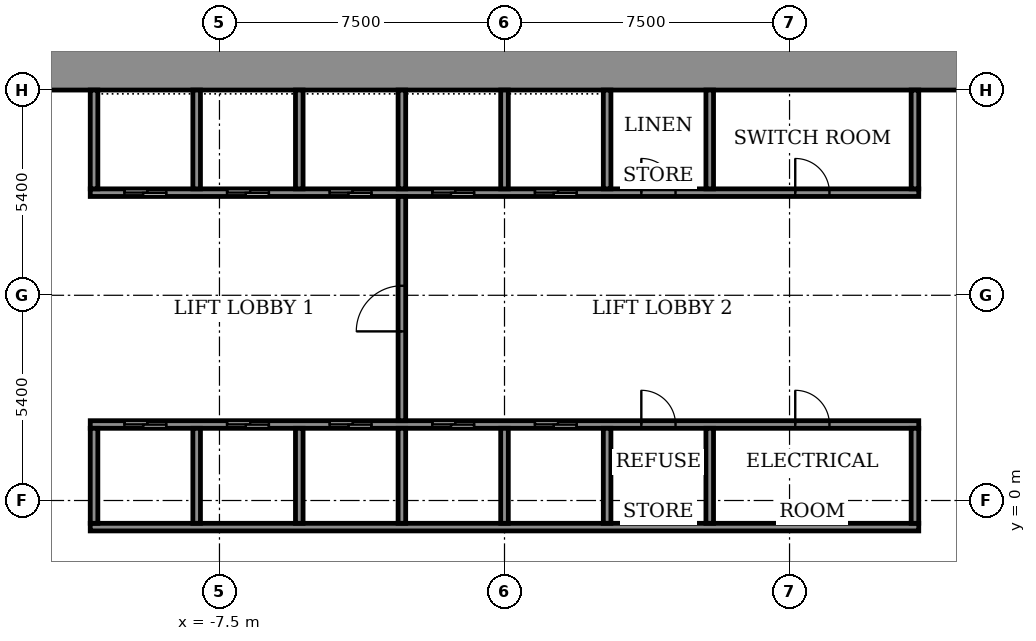
"""IFC4 building model, lengths in metres.
Left out: names, types, materials, properties, quantities, classifications, styles, units other than length and angle.
Written with IfcOpenShell. Run it as: python <this file> out.ifc"""

import sys

from ifc_helpers import new_model, si_unit, direction, frame, frame_2d, origin, place, context, subcontext, project, spatial, rectangle, extrude, element, fill, save


model = new_model("IFC4")
c1 = context("Model", 3, precision=1e-05, world=origin(), true_north=direction((0.0, 1.0)))
c2 = subcontext(c1, "Body", "Model", "MODEL_VIEW")
j1 = project(units=[si_unit("LENGTHUNIT", "METRE"), si_unit("PLANEANGLEUNIT", "RADIAN")], contexts=[c1])
p1 = place(None, origin())
s1 = spatial("IfcSite", under=j1, at=p1, CompositionType="ELEMENT")
p2 = place(p1, origin())
s2 = spatial("IfcBuilding", under=s1, at=p2, CompositionType="ELEMENT")
p3 = place(p2, frame((0.0, 0.0, 25.0)))
s3 = spatial("IfcBuildingStorey", under=s2, at=p3, CompositionType="ELEMENT", Elevation=25.0)
p4 = place(p3, frame((-15.0, 11.4, 0.0), z_axis=(0.0, 0.0, 1.0), x_axis=(1.0, 0.0, 0.0)))
e1 = element("IfcWall", 1, at=p4, inside=s3, PredefinedType="SHEAR", context=c2, shape_type="SweptSolid", body=[
    extrude(rectangle(XDim=30.0, YDim=1.2, at=frame_2d((15.0, 0.0))), origin(), (0.0, 0.0, 1.0), 4.5),
])
p5 = place(p3, frame((-10.9, -0.7, 0.0), z_axis=(0.0, 0.0, 1.0), x_axis=(1.0, 0.0, 0.0)))
e2 = element("IfcWall", 2, at=p5, inside=s3, PredefinedType="SHEAR", context=c2, shape_type="SweptSolid", body=[
    extrude(rectangle(XDim=21.8, YDim=0.2, at=frame_2d((10.9, 0.0))), origin(), (0.0, 0.0, 1.0), 3.95),
])
p6 = place(p3, frame((-10.9, 2.0, 0.0), z_axis=(0.0, 0.0, 1.0), x_axis=(1.0, 0.0, 0.0)))
e3 = element("IfcWall", 3, at=p6, inside=s3, PredefinedType="SHEAR", context=c2, shape_type="SweptSolid", body=[
    extrude(rectangle(XDim=21.8, YDim=0.2, at=frame_2d((10.9, 0.0))), origin(), (0.0, 0.0, 1.0), 3.95),
])
p7 = place(p6, frame((0.9, 0.0, 0.0)))
e4 = element("IfcOpeningElement", 4, at=p7, cuts=e3, PredefinedType="OPENING", context=c2, shape_type="SweptSolid", body=[
    extrude(rectangle(XDim=1.1, YDim=2.1, at=frame_2d((0.55, 1.05))), frame((0.0, 0.11, 0.0), z_axis=(0.0, -1.0, 0.0), x_axis=(1.0, 0.0, 0.0)), (0.0, 0.0, 1.0), 0.22),
])
p8 = place(p6, frame((3.6, 0.0, 0.0)))
e5 = element("IfcOpeningElement", 5, at=p8, cuts=e3, PredefinedType="OPENING", context=c2, shape_type="SweptSolid", body=[
    extrude(rectangle(XDim=1.1, YDim=2.1, at=frame_2d((0.55, 1.05))), frame((0.0, 0.11, 0.0), z_axis=(0.0, -1.0, 0.0), x_axis=(1.0, 0.0, 0.0)), (0.0, 0.0, 1.0), 0.22),
])
p9 = place(p6, frame((6.3, 0.0, 0.0)))
e6 = element("IfcOpeningElement", 6, at=p9, cuts=e3, PredefinedType="OPENING", context=c2, shape_type="SweptSolid", body=[
    extrude(rectangle(XDim=1.1, YDim=2.1, at=frame_2d((0.55, 1.05))), frame((0.0, 0.11, 0.0), z_axis=(0.0, -1.0, 0.0), x_axis=(1.0, 0.0, 0.0)), (0.0, 0.0, 1.0), 0.22),
])
p10 = place(p6, frame((9.0, 0.0, 0.0)))
e7 = element("IfcOpeningElement", 7, at=p10, cuts=e3, PredefinedType="OPENING", context=c2, shape_type="SweptSolid", body=[
    extrude(rectangle(XDim=1.1, YDim=2.1, at=frame_2d((0.55, 1.05))), frame((0.0, 0.11, 0.0), z_axis=(0.0, -1.0, 0.0), x_axis=(1.0, 0.0, 0.0)), (0.0, 0.0, 1.0), 0.22),
])
p11 = place(p6, frame((11.7, 0.0, 0.0)))
e8 = element("IfcOpeningElement", 8, at=p11, cuts=e3, PredefinedType="OPENING", context=c2, shape_type="SweptSolid", body=[
    extrude(rectangle(XDim=1.1, YDim=2.1, at=frame_2d((0.55, 1.05))), frame((0.0, 0.11, 0.0), z_axis=(0.0, -1.0, 0.0), x_axis=(1.0, 0.0, 0.0)), (0.0, 0.0, 1.0), 0.22),
])
p12 = place(p6, frame((14.5, 0.0, 0.0)))
e9 = element("IfcOpeningElement", 9, at=p12, cuts=e3, PredefinedType="OPENING", context=c2, shape_type="SweptSolid", body=[
    extrude(rectangle(XDim=0.9, YDim=2.1, at=frame_2d((0.45, 1.05))), frame((0.0, 0.11, 0.0), z_axis=(0.0, -1.0, 0.0), x_axis=(1.0, 0.0, 0.0)), (0.0, 0.0, 1.0), 0.22),
])
p13 = place(p6, frame((18.55, 0.0, 0.0)))
e10 = element("IfcOpeningElement", 10, at=p13, cuts=e3, PredefinedType="OPENING", context=c2, shape_type="SweptSolid", body=[
    extrude(rectangle(XDim=0.9, YDim=2.1, at=frame_2d((0.45, 1.05))), frame((0.0, 0.11, 0.0), z_axis=(0.0, -1.0, 0.0), x_axis=(1.0, 0.0, 0.0)), (0.0, 0.0, 1.0), 0.22),
])
p14 = place(p3, frame((-10.9, 8.1, 0.0), z_axis=(0.0, 0.0, 1.0), x_axis=(1.0, 0.0, 0.0)))
e11 = element("IfcWall", 11, at=p14, inside=s3, PredefinedType="SHEAR", context=c2, shape_type="SweptSolid", body=[
    extrude(rectangle(XDim=21.8, YDim=0.2, at=frame_2d((10.9, 0.0))), origin(), (0.0, 0.0, 1.0), 3.95),
])
p15 = place(p14, frame((0.9, 0.0, 0.0)))
e12 = element("IfcOpeningElement", 12, at=p15, cuts=e11, PredefinedType="OPENING", context=c2, shape_type="SweptSolid", body=[
    extrude(rectangle(XDim=1.1, YDim=2.1, at=frame_2d((0.55, 1.05))), frame((0.0, 0.11, 0.0), z_axis=(0.0, -1.0, 0.0), x_axis=(1.0, 0.0, 0.0)), (0.0, 0.0, 1.0), 0.22),
])
p16 = place(p14, frame((3.6, 0.0, 0.0)))
e13 = element("IfcOpeningElement", 13, at=p16, cuts=e11, PredefinedType="OPENING", context=c2, shape_type="SweptSolid", body=[
    extrude(rectangle(XDim=1.1, YDim=2.1, at=frame_2d((0.55, 1.05))), frame((0.0, 0.11, 0.0), z_axis=(0.0, -1.0, 0.0), x_axis=(1.0, 0.0, 0.0)), (0.0, 0.0, 1.0), 0.22),
])
p17 = place(p14, frame((6.3, 0.0, 0.0)))
e14 = element("IfcOpeningElement", 14, at=p17, cuts=e11, PredefinedType="OPENING", context=c2, shape_type="SweptSolid", body=[
    extrude(rectangle(XDim=1.1, YDim=2.1, at=frame_2d((0.55, 1.05))), frame((0.0, 0.11, 0.0), z_axis=(0.0, -1.0, 0.0), x_axis=(1.0, 0.0, 0.0)), (0.0, 0.0, 1.0), 0.22),
])
p18 = place(p14, frame((9.0, 0.0, 0.0)))
e15 = element("IfcOpeningElement", 15, at=p18, cuts=e11, PredefinedType="OPENING", context=c2, shape_type="SweptSolid", body=[
    extrude(rectangle(XDim=1.1, YDim=2.1, at=frame_2d((0.55, 1.05))), frame((0.0, 0.11, 0.0), z_axis=(0.0, -1.0, 0.0), x_axis=(1.0, 0.0, 0.0)), (0.0, 0.0, 1.0), 0.22),
])
p19 = place(p14, frame((11.7, 0.0, 0.0)))
e16 = element("IfcOpeningElement", 16, at=p19, cuts=e11, PredefinedType="OPENING", context=c2, shape_type="SweptSolid", body=[
    extrude(rectangle(XDim=1.1, YDim=2.1, at=frame_2d((0.55, 1.05))), frame((0.0, 0.11, 0.0), z_axis=(0.0, -1.0, 0.0), x_axis=(1.0, 0.0, 0.0)), (0.0, 0.0, 1.0), 0.22),
])
p20 = place(p14, frame((14.5, 0.0, 0.0)))
e17 = element("IfcOpeningElement", 17, at=p20, cuts=e11, PredefinedType="OPENING", context=c2, shape_type="SweptSolid", body=[
    extrude(rectangle(XDim=0.9, YDim=2.1, at=frame_2d((0.45, 1.05))), frame((0.0, 0.11, 0.0), z_axis=(0.0, -1.0, 0.0), x_axis=(1.0, 0.0, 0.0)), (0.0, 0.0, 1.0), 0.22),
])
p21 = place(p14, frame((18.55, 0.0, 0.0)))
e18 = element("IfcOpeningElement", 18, at=p21, cuts=e11, PredefinedType="OPENING", context=c2, shape_type="SweptSolid", body=[
    extrude(rectangle(XDim=0.9, YDim=2.1, at=frame_2d((0.45, 1.05))), frame((0.0, 0.11, 0.0), z_axis=(0.0, -1.0, 0.0), x_axis=(1.0, 0.0, 0.0)), (0.0, 0.0, 1.0), 0.22),
])
for number, where, z_axis, x_axis in (
    (19, (-10.8, -0.6, 0.0), (0.0, 0.0, 1.0), (0.0, 1.0, 0.0)),
    (20, (-8.1, -0.6, 0.0), (0.0, 0.0, 1.0), (0.0, 1.0, 0.0)),
    (21, (-5.4, -0.6, 0.0), (0.0, 0.0, 1.0), (0.0, 1.0, 0.0)),
    (22, (-2.7, -0.6, 0.0), (0.0, 0.0, 1.0), (0.0, 1.0, 0.0)),
    (23, (0.0, -0.6, 0.0), (0.0, 0.0, 1.0), (0.0, 1.0, 0.0)),
    (24, (2.7, -0.6, 0.0), (0.0, 0.0, 1.0), (0.0, 1.0, 0.0)),
):
    element("IfcWall", number, at=place(p3, frame(where, z_axis=z_axis, x_axis=x_axis)), inside=s3, PredefinedType="SHEAR", context=c2, shape_type="SweptSolid", body=[
        extrude(rectangle(XDim=2.5, YDim=0.2, at=frame_2d((1.25, 0.0))), origin(), (0.0, 0.0, 1.0), 3.95),
    ])
for number, where, z_axis, x_axis in (
    (25, (5.4, -0.6, 0.0), (0.0, 0.0, 1.0), (0.0, 1.0, 0.0)),
    (26, (10.8, -0.6, 0.0), (0.0, 0.0, 1.0), (0.0, 1.0, 0.0)),
):
    element("IfcWall", number, at=place(p3, frame(where, z_axis=z_axis, x_axis=x_axis)), inside=s3, PredefinedType="STANDARD", context=c2, shape_type="SweptSolid", body=[
        extrude(rectangle(XDim=2.5, YDim=0.2, at=frame_2d((1.25, 0.0))), origin(), (0.0, 0.0, 1.0), 3.95),
    ])
for number, where, z_axis, x_axis in (
    (27, (-10.8, 8.2, 0.0), (0.0, 0.0, 1.0), (0.0, 1.0, 0.0)),
    (28, (-8.1, 8.2, 0.0), (0.0, 0.0, 1.0), (0.0, 1.0, 0.0)),
    (29, (-5.4, 8.2, 0.0), (0.0, 0.0, 1.0), (0.0, 1.0, 0.0)),
    (30, (-2.7, 8.2, 0.0), (0.0, 0.0, 1.0), (0.0, 1.0, 0.0)),
    (31, (0.0, 8.2, 0.0), (0.0, 0.0, 1.0), (0.0, 1.0, 0.0)),
    (32, (2.7, 8.2, 0.0), (0.0, 0.0, 1.0), (0.0, 1.0, 0.0)),
):
    element("IfcWall", number, at=place(p3, frame(where, z_axis=z_axis, x_axis=x_axis)), inside=s3, PredefinedType="SHEAR", context=c2, shape_type="SweptSolid", body=[
        extrude(rectangle(XDim=2.6, YDim=0.2, at=frame_2d((1.3, 0.0))), origin(), (0.0, 0.0, 1.0), 3.95),
    ])
for number, where, z_axis, x_axis in (
    (33, (5.4, 8.2, 0.0), (0.0, 0.0, 1.0), (0.0, 1.0, 0.0)),
    (34, (10.8, 8.2, 0.0), (0.0, 0.0, 1.0), (0.0, 1.0, 0.0)),
):
    element("IfcWall", number, at=place(p3, frame(where, z_axis=z_axis, x_axis=x_axis)), inside=s3, PredefinedType="STANDARD", context=c2, shape_type="SweptSolid", body=[
        extrude(rectangle(XDim=2.6, YDim=0.2, at=frame_2d((1.3, 0.0))), origin(), (0.0, 0.0, 1.0), 3.95),
    ])
p22 = place(p3, frame((-2.7, 2.1, 0.0), z_axis=(0.0, 0.0, 1.0), x_axis=(0.0, 1.0, 0.0)))
e35 = element("IfcWall", 35, at=p22, inside=s3, PredefinedType="STANDARD", context=c2, shape_type="SweptSolid", body=[
    extrude(rectangle(XDim=5.9, YDim=0.2, at=frame_2d((2.95, 0.0))), origin(), (0.0, 0.0, 1.0), 3.95),
])
p23 = place(p22, frame((2.35, 0.0, 0.0)))
e36 = element("IfcOpeningElement", 36, at=p23, cuts=e35, PredefinedType="OPENING", context=c2, shape_type="SweptSolid", body=[
    extrude(rectangle(XDim=1.2, YDim=2.1, at=frame_2d((0.6, 1.05))), frame((0.0, 0.11, 0.0), z_axis=(0.0, -1.0, 0.0), x_axis=(1.0, 0.0, 0.0)), (0.0, 0.0, 1.0), 0.22),
])
p24 = place(p7, origin())
e37 = element("IfcDoor", 37, at=p24, inside=s3, OperationType="SLIDING_TO_LEFT", PredefinedType="DOOR", context=c2, shape_type="SweptSolid", body=[
    extrude(rectangle(XDim=1.1, YDim=2.1, at=frame_2d((0.55, 1.05))), frame((0.0, 0.025, 0.0), z_axis=(0.0, -1.0, 0.0), x_axis=(1.0, 0.0, 0.0)), (0.0, 0.0, 1.0), 0.05),
])
fill(e4, e37)
p25 = place(p8, origin())
e38 = element("IfcDoor", 38, at=p25, inside=s3, OperationType="SLIDING_TO_LEFT", PredefinedType="DOOR", context=c2, shape_type="SweptSolid", body=[
    extrude(rectangle(XDim=1.1, YDim=2.1, at=frame_2d((0.55, 1.05))), frame((0.0, 0.025, 0.0), z_axis=(0.0, -1.0, 0.0), x_axis=(1.0, 0.0, 0.0)), (0.0, 0.0, 1.0), 0.05),
])
fill(e5, e38)
p26 = place(p9, origin())
e39 = element("IfcDoor", 39, at=p26, inside=s3, OperationType="SLIDING_TO_LEFT", PredefinedType="DOOR", context=c2, shape_type="SweptSolid", body=[
    extrude(rectangle(XDim=1.1, YDim=2.1, at=frame_2d((0.55, 1.05))), frame((0.0, 0.025, 0.0), z_axis=(0.0, -1.0, 0.0), x_axis=(1.0, 0.0, 0.0)), (0.0, 0.0, 1.0), 0.05),
])
fill(e6, e39)
p27 = place(p10, origin())
e40 = element("IfcDoor", 40, at=p27, inside=s3, OperationType="SLIDING_TO_LEFT", PredefinedType="DOOR", context=c2, shape_type="SweptSolid", body=[
    extrude(rectangle(XDim=1.1, YDim=2.1, at=frame_2d((0.55, 1.05))), frame((0.0, 0.025, 0.0), z_axis=(0.0, -1.0, 0.0), x_axis=(1.0, 0.0, 0.0)), (0.0, 0.0, 1.0), 0.05),
])
fill(e7, e40)
p28 = place(p11, origin())
e41 = element("IfcDoor", 41, at=p28, inside=s3, OperationType="SLIDING_TO_LEFT", PredefinedType="DOOR", context=c2, shape_type="SweptSolid", body=[
    extrude(rectangle(XDim=1.1, YDim=2.1, at=frame_2d((0.55, 1.05))), frame((0.0, 0.025, 0.0), z_axis=(0.0, -1.0, 0.0), x_axis=(1.0, 0.0, 0.0)), (0.0, 0.0, 1.0), 0.05),
])
fill(e8, e41)
p29 = place(p15, origin())
e42 = element("IfcDoor", 42, at=p29, inside=s3, OperationType="SLIDING_TO_LEFT", PredefinedType="DOOR", context=c2, shape_type="SweptSolid", body=[
    extrude(rectangle(XDim=1.1, YDim=2.1, at=frame_2d((0.55, 1.05))), frame((0.0, 0.025, 0.0), z_axis=(0.0, -1.0, 0.0), x_axis=(1.0, 0.0, 0.0)), (0.0, 0.0, 1.0), 0.05),
])
fill(e12, e42)
p30 = place(p16, origin())
e43 = element("IfcDoor", 43, at=p30, inside=s3, OperationType="SLIDING_TO_LEFT", PredefinedType="DOOR", context=c2, shape_type="SweptSolid", body=[
    extrude(rectangle(XDim=1.1, YDim=2.1, at=frame_2d((0.55, 1.05))), frame((0.0, 0.025, 0.0), z_axis=(0.0, -1.0, 0.0), x_axis=(1.0, 0.0, 0.0)), (0.0, 0.0, 1.0), 0.05),
])
fill(e13, e43)
p31 = place(p17, origin())
e44 = element("IfcDoor", 44, at=p31, inside=s3, OperationType="SLIDING_TO_LEFT", PredefinedType="DOOR", context=c2, shape_type="SweptSolid", body=[
    extrude(rectangle(XDim=1.1, YDim=2.1, at=frame_2d((0.55, 1.05))), frame((0.0, 0.025, 0.0), z_axis=(0.0, -1.0, 0.0), x_axis=(1.0, 0.0, 0.0)), (0.0, 0.0, 1.0), 0.05),
])
fill(e14, e44)
p32 = place(p18, origin())
e45 = element("IfcDoor", 45, at=p32, inside=s3, OperationType="SLIDING_TO_LEFT", PredefinedType="DOOR", context=c2, shape_type="SweptSolid", body=[
    extrude(rectangle(XDim=1.1, YDim=2.1, at=frame_2d((0.55, 1.05))), frame((0.0, 0.025, 0.0), z_axis=(0.0, -1.0, 0.0), x_axis=(1.0, 0.0, 0.0)), (0.0, 0.0, 1.0), 0.05),
])
fill(e15, e45)
p33 = place(p19, origin())
e46 = element("IfcDoor", 46, at=p33, inside=s3, OperationType="SLIDING_TO_LEFT", PredefinedType="DOOR", context=c2, shape_type="SweptSolid", body=[
    extrude(rectangle(XDim=1.1, YDim=2.1, at=frame_2d((0.55, 1.05))), frame((0.0, 0.025, 0.0), z_axis=(0.0, -1.0, 0.0), x_axis=(1.0, 0.0, 0.0)), (0.0, 0.0, 1.0), 0.05),
])
fill(e16, e46)
p34 = place(p12, origin())
e47 = element("IfcDoor", 47, at=p34, inside=s3, OperationType="SINGLE_SWING_RIGHT", PredefinedType="DOOR", context=c2, shape_type="SweptSolid", body=[
    extrude(rectangle(XDim=0.9, YDim=2.1, at=frame_2d((0.45, 1.05))), frame((0.0, 0.025, 0.0), z_axis=(0.0, -1.0, 0.0), x_axis=(1.0, 0.0, 0.0)), (0.0, 0.0, 1.0), 0.05),
])
fill(e9, e47)
p35 = place(p13, origin())
e48 = element("IfcDoor", 48, at=p35, inside=s3, OperationType="SINGLE_SWING_LEFT", PredefinedType="DOOR", context=c2, shape_type="SweptSolid", body=[
    extrude(rectangle(XDim=0.9, YDim=2.1, at=frame_2d((0.45, 1.05))), frame((0.0, 0.025, 0.0), z_axis=(0.0, -1.0, 0.0), x_axis=(1.0, 0.0, 0.0)), (0.0, 0.0, 1.0), 0.05),
])
fill(e10, e48)
p36 = place(p20, origin())
e49 = element("IfcDoor", 49, at=p36, inside=s3, OperationType="SINGLE_SWING_RIGHT", PredefinedType="DOOR", context=c2, shape_type="SweptSolid", body=[
    extrude(rectangle(XDim=0.9, YDim=2.1, at=frame_2d((0.45, 1.05))), frame((0.0, 0.025, 0.0), z_axis=(0.0, -1.0, 0.0), x_axis=(1.0, 0.0, 0.0)), (0.0, 0.0, 1.0), 0.05),
])
fill(e17, e49)
p37 = place(p21, origin())
e50 = element("IfcDoor", 50, at=p37, inside=s3, OperationType="SINGLE_SWING_LEFT", PredefinedType="DOOR", context=c2, shape_type="SweptSolid", body=[
    extrude(rectangle(XDim=0.9, YDim=2.1, at=frame_2d((0.45, 1.05))), frame((0.0, 0.025, 0.0), z_axis=(0.0, -1.0, 0.0), x_axis=(1.0, 0.0, 0.0)), (0.0, 0.0, 1.0), 0.05),
])
fill(e18, e50)
p38 = place(p23, origin())
e51 = element("IfcDoor", 51, at=p38, inside=s3, OperationType="SINGLE_SWING_LEFT", PredefinedType="DOOR", context=c2, shape_type="SweptSolid", body=[
    extrude(rectangle(XDim=1.2, YDim=2.1, at=frame_2d((0.6, 1.05))), frame((0.0, 0.025, 0.0), z_axis=(0.0, -1.0, 0.0), x_axis=(1.0, 0.0, 0.0)), (0.0, 0.0, 1.0), 0.05),
])
fill(e36, e51)
save(model, sys.argv[1])
